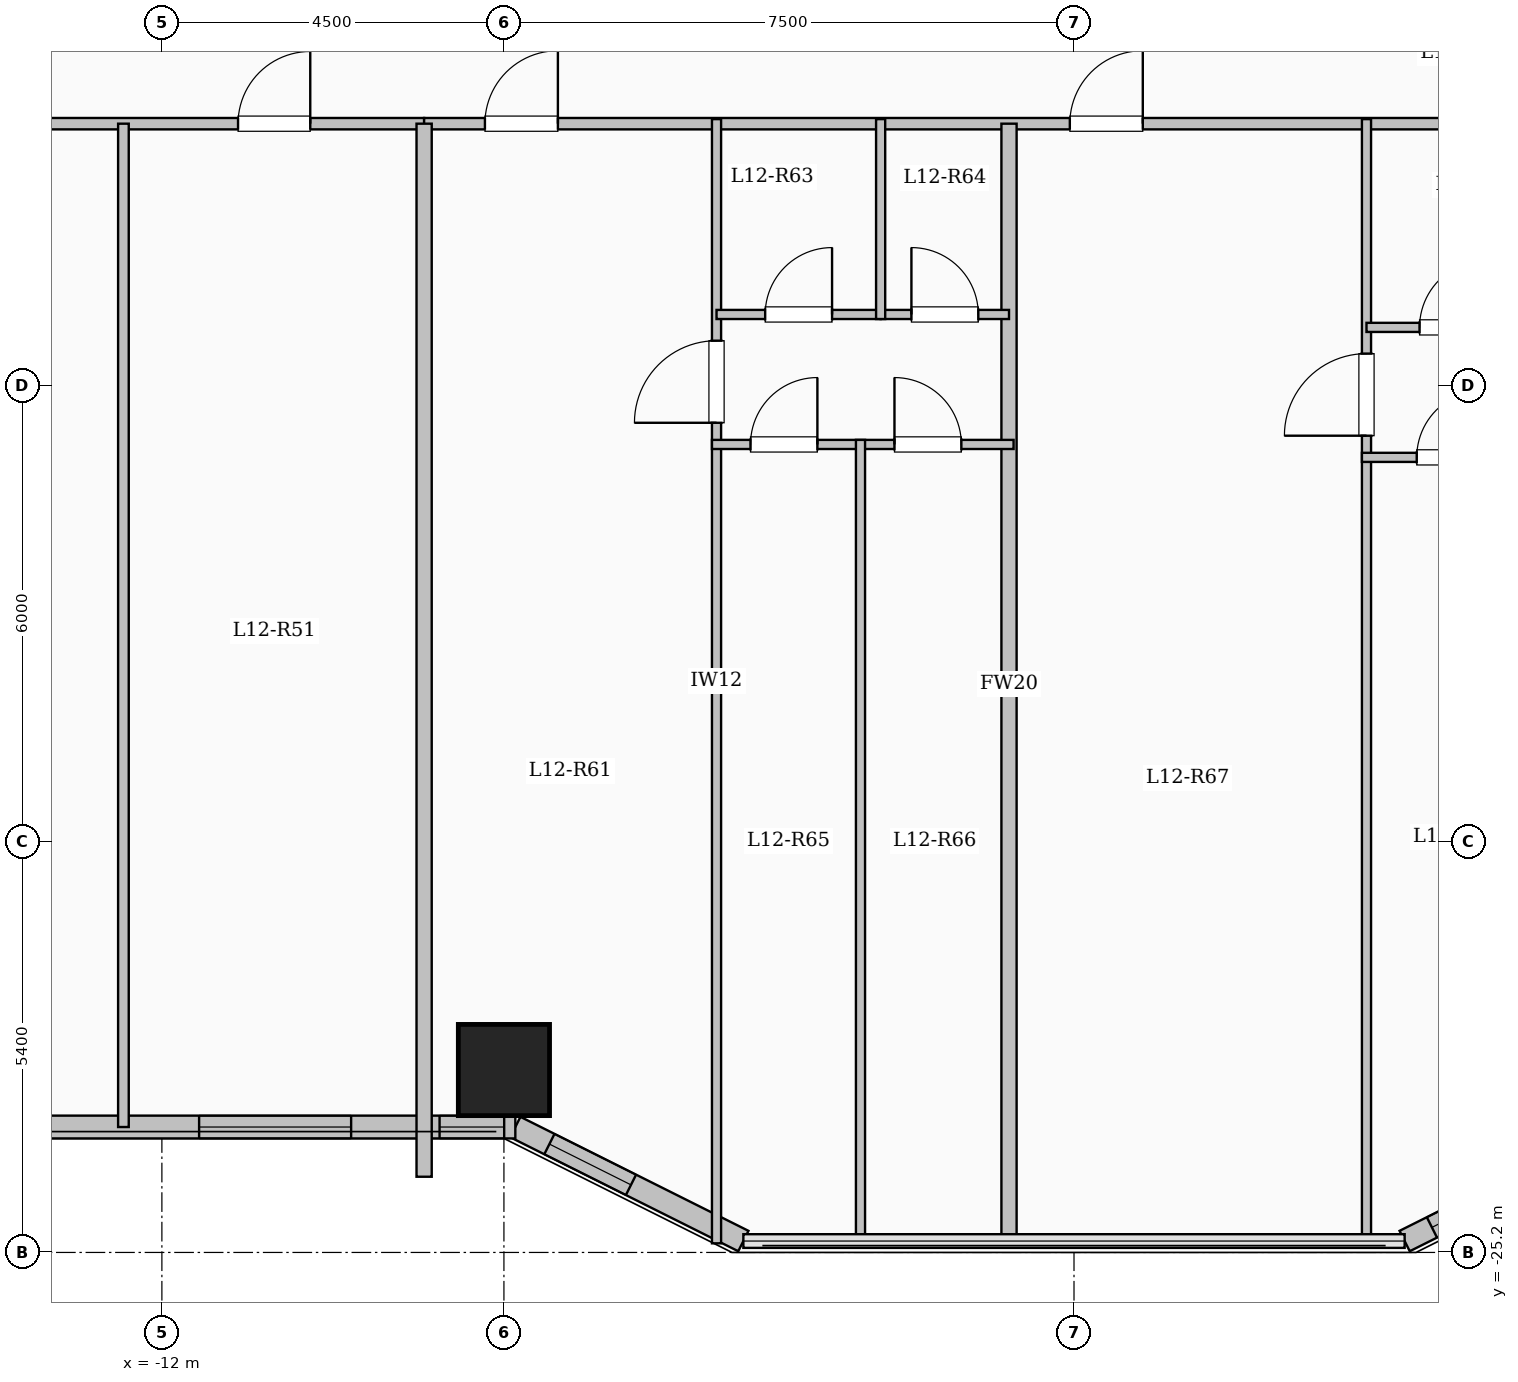
"""IFC4 building model, lengths in metres.
Left out: names, types, materials, properties, quantities, classifications, styles, units other than length and angle.
Written with IfcOpenShell. Run it as: python <this file> out.ifc"""

import sys

from ifc_helpers import new_model, si_unit, direction, frame, frame_2d, origin, origin_2d, place, context, subcontext, project, spatial, rectangle, extrude, element, fill, save


model = new_model("IFC4")
c1 = context("Model", 3, precision=1e-05, world=origin(), true_north=direction((0.0, 1.0)))
c2 = subcontext(c1, "Body", "Model", "MODEL_VIEW")
j1 = project(units=[si_unit("LENGTHUNIT", "METRE"), si_unit("PLANEANGLEUNIT", "RADIAN")], contexts=[c1])
p1 = place(None, origin())
s1 = spatial("IfcSite", under=j1, at=p1, CompositionType="ELEMENT")
p2 = place(p1, origin())
s2 = spatial("IfcBuilding", under=s1, at=p2, CompositionType="ELEMENT")
p3 = place(p2, frame((0.0, 0.0, 47.45)))
s3 = spatial("IfcBuildingStorey", under=s2, at=p3, CompositionType="ELEMENT", Elevation=47.45)
p4 = place(p3, frame((-7.5, -22.8, 0.0), z_axis=(0.0, 0.0, 1.0), x_axis=(1.0, 0.0, 0.0)))
e1 = element("IfcColumn", 1, at=p4, inside=s3, PredefinedType="COLUMN", context=c2, shape_type="SweptSolid", body=[
    extrude(rectangle(XDim=1.2, YDim=1.2, at=origin_2d()), origin(), (0.0, 0.0, 1.0), 3.35),
])
p5 = place(p3, frame((7.35, -23.55, 0.0), z_axis=(0.0, 0.0, 1.0), x_axis=(-0.894427191, -0.4472135955, 0.0)))
e2 = element("IfcWall", 2, at=p5, inside=s3, PredefinedType="SOLIDWALL", context=c2, shape_type="SweptSolid", body=[
    extrude(rectangle(XDim=3.354, YDim=0.3, at=frame_2d((1.677, 0.0))), origin(), (0.0, 0.0, 1.0), 3.1),
])
p6 = place(p5, frame((2.103, 0.0, 0.95)))
e3 = element("IfcOpeningElement", 3, at=p6, cuts=e2, PredefinedType="OPENING", context=c2, shape_type="SweptSolid", body=[
    extrude(rectangle(XDim=0.85, YDim=1.5, at=frame_2d((0.425, 0.75))), frame((0.0, 0.16, 0.0), z_axis=(0.0, -1.0, 0.0), x_axis=(1.0, 0.0, 0.0)), (0.0, 0.0, 1.0), 0.32),
])
p7 = place(p3, frame((-4.35, -25.05, 0.0), z_axis=(0.0, 0.0, 1.0), x_axis=(-0.894427191, 0.4472135955, 0.0)))
e4 = element("IfcWall", 4, at=p7, inside=s3, PredefinedType="SOLIDWALL", context=c2, shape_type="SweptSolid", body=[
    extrude(rectangle(XDim=3.354, YDim=0.3, at=frame_2d((1.677, 0.0))), origin(), (0.0, 0.0, 1.0), 3.1),
])
p8 = place(p7, frame((1.653, 0.0, 0.95)))
e5 = element("IfcOpeningElement", 5, at=p8, cuts=e4, PredefinedType="OPENING", context=c2, shape_type="SweptSolid", body=[
    extrude(rectangle(XDim=1.2, YDim=1.5, at=frame_2d((0.6, 0.75))), frame((0.0, 0.16, 0.0), z_axis=(0.0, -1.0, 0.0), x_axis=(1.0, 0.0, 0.0)), (0.0, 0.0, 1.0), 0.32),
])
p9 = place(p3, frame((-7.35, -23.55, 0.0), z_axis=(0.0, 0.0, 1.0), x_axis=(-1.0, 0.0, 0.0)))
e6 = element("IfcWall", 6, at=p9, inside=s3, PredefinedType="SOLIDWALL", context=c2, shape_type="SweptSolid", body=[
    extrude(rectangle(XDim=15.3, YDim=0.3, at=frame_2d((7.65, 0.0))), origin(), (0.0, 0.0, 1.0), 3.1),
])
p10 = place(p9, frame((0.147, 0.0, 0.95)))
e7 = element("IfcOpeningElement", 7, at=p10, cuts=e6, PredefinedType="OPENING", context=c2, shape_type="SweptSolid", body=[
    extrude(rectangle(XDim=0.85, YDim=1.5, at=frame_2d((0.425, 0.75))), frame((0.0, 0.16, 0.0), z_axis=(0.0, -1.0, 0.0), x_axis=(1.0, 0.0, 0.0)), (0.0, 0.0, 1.0), 0.32),
])
p11 = place(p9, frame((2.16, 0.0, 0.9)))
e8 = element("IfcOpeningElement", 8, at=p11, cuts=e6, PredefinedType="OPENING", context=c2, shape_type="SweptSolid", body=[
    extrude(rectangle(XDim=2.0, YDim=1.7, at=frame_2d((1.0, 0.85))), frame((0.0, 0.16, 0.0), z_axis=(0.0, -1.0, 0.0), x_axis=(1.0, 0.0, 0.0)), (0.0, 0.0, 1.0), 0.32),
])
p12 = place(p9, frame((6.65, 0.0, 0.9)))
e9 = element("IfcOpeningElement", 9, at=p12, cuts=e6, PredefinedType="OPENING", context=c2, shape_type="SweptSolid", body=[
    extrude(rectangle(XDim=2.0, YDim=1.7, at=frame_2d((1.0, 0.85))), frame((0.0, 0.16, 0.0), z_axis=(0.0, -1.0, 0.0), x_axis=(1.0, 0.0, 0.0)), (0.0, 0.0, 1.0), 0.32),
])
p13 = place(p9, frame((11.717, 0.0, 0.9)))
e10 = element("IfcOpeningElement", 10, at=p13, cuts=e6, PredefinedType="OPENING", context=c2, shape_type="SweptSolid", body=[
    extrude(rectangle(XDim=2.0, YDim=1.7, at=frame_2d((1.0, 0.85))), frame((0.0, 0.16, 0.0), z_axis=(0.0, -1.0, 0.0), x_axis=(1.0, 0.0, 0.0)), (0.0, 0.0, 1.0), 0.32),
])
p14 = place(p3, frame((-22.55, -10.35, 0.0), z_axis=(0.0, 0.0, 1.0), x_axis=(1.0, 0.0, 0.0)))
e11 = element("IfcWall", 11, at=p14, inside=s3, PredefinedType="PARTITIONING", context=c2, shape_type="SweptSolid", body=[
    extrude(rectangle(XDim=14.0, YDim=0.15, at=frame_2d((7.0, 0.0))), origin(), (0.0, 0.0, 1.0), 3.1),
])
p15 = place(p14, frame((2.006, 0.0, 0.0)))
e12 = element("IfcOpeningElement", 12, at=p15, cuts=e11, PredefinedType="OPENING", context=c2, shape_type="SweptSolid", body=[
    extrude(rectangle(XDim=0.95, YDim=2.15, at=frame_2d((0.475, 1.075))), frame((0.0, 0.085, 0.0), z_axis=(0.0, -1.0, 0.0), x_axis=(1.0, 0.0, 0.0)), (0.0, 0.0, 1.0), 0.17),
])
p16 = place(p14, frame((7.058, 0.0, 0.0)))
e13 = element("IfcOpeningElement", 13, at=p16, cuts=e11, PredefinedType="OPENING", context=c2, shape_type="SweptSolid", body=[
    extrude(rectangle(XDim=0.95, YDim=2.15, at=frame_2d((0.475, 1.075))), frame((0.0, 0.085, 0.0), z_axis=(0.0, -1.0, 0.0), x_axis=(1.0, 0.0, 0.0)), (0.0, 0.0, 1.0), 0.17),
])
p17 = place(p14, frame((11.552, 0.0, 0.0)))
e14 = element("IfcOpeningElement", 14, at=p17, cuts=e11, PredefinedType="OPENING", context=c2, shape_type="SweptSolid", body=[
    extrude(rectangle(XDim=0.95, YDim=2.15, at=frame_2d((0.475, 1.075))), frame((0.0, 0.085, 0.0), z_axis=(0.0, -1.0, 0.0), x_axis=(1.0, 0.0, 0.0)), (0.0, 0.0, 1.0), 0.17),
])
p18 = place(p3, frame((-8.55, -10.35, 0.0), z_axis=(0.0, 0.0, 1.0), x_axis=(1.0, 0.0, 0.0)))
e15 = element("IfcWall", 15, at=p18, inside=s3, PredefinedType="PARTITIONING", context=c2, shape_type="SweptSolid", body=[
    extrude(rectangle(XDim=17.1, YDim=0.15, at=frame_2d((8.55, 0.0))), origin(), (0.0, 0.0, 1.0), 3.1),
])
p19 = place(p18, frame((0.8, 0.0, 0.0)))
e16 = element("IfcOpeningElement", 16, at=p19, cuts=e15, PredefinedType="OPENING", context=c2, shape_type="SweptSolid", body=[
    extrude(rectangle(XDim=0.96, YDim=2.15, at=frame_2d((0.48, 1.075))), frame((0.0, 0.085, 0.0), z_axis=(0.0, -1.0, 0.0), x_axis=(1.0, 0.0, 0.0)), (0.0, 0.0, 1.0), 0.17),
])
p20 = place(p18, frame((8.495, 0.0, 0.0)))
e17 = element("IfcOpeningElement", 17, at=p20, cuts=e15, PredefinedType="OPENING", context=c2, shape_type="SweptSolid", body=[
    extrude(rectangle(XDim=0.96, YDim=2.15, at=frame_2d((0.48, 1.075))), frame((0.0, 0.085, 0.0), z_axis=(0.0, -1.0, 0.0), x_axis=(1.0, 0.0, 0.0)), (0.0, 0.0, 1.0), 0.17),
])
p21 = place(p3, frame((-12.506, -23.55, 0.0), z_axis=(0.0, 0.0, 1.0), x_axis=(0.0, 1.0, 0.0)))
e18 = element("IfcWall", 18, at=p21, inside=s3, PredefinedType="PARTITIONING", context=c2, shape_type="SweptSolid", body=[
    extrude(rectangle(XDim=13.2, YDim=0.14, at=frame_2d((6.6, 0.0))), origin(), (0.0, 0.0, 1.0), 3.1),
])
p22 = place(p3, frame((-8.55, -24.204, 0.0), z_axis=(0.0, 0.0, 1.0), x_axis=(0.0, 1.0, 0.0)))
e19 = element("IfcWall", 19, at=p22, inside=s3, PredefinedType="SOLIDWALL", context=c2, shape_type="SweptSolid", body=[
    extrude(rectangle(XDim=13.854, YDim=0.2, at=frame_2d((6.927, 0.0))), origin(), (0.0, 0.0, 1.0), 3.1),
])
p23 = place(p3, frame((-0.855, -25.08, 0.0), z_axis=(0.0, 0.0, 1.0), x_axis=(0.0, 1.0, 0.0)))
e20 = element("IfcWall", 20, at=p23, inside=s3, PredefinedType="SOLIDWALL", context=c2, shape_type="SweptSolid", body=[
    extrude(rectangle(XDim=14.73, YDim=0.2, at=frame_2d((7.365, 0.0))), origin(), (0.0, 0.0, 1.0), 3.1),
])
p24 = place(p3, frame((-4.703, -25.08, 0.0), z_axis=(0.0, 0.0, 1.0), x_axis=(0.0, 1.0, 0.0)))
e21 = element("IfcWall", 21, at=p24, inside=s3, PredefinedType="PARTITIONING", context=c2, shape_type="SweptSolid", body=[
    extrude(rectangle(XDim=14.79, YDim=0.12, at=frame_2d((7.395, 0.0))), origin(), (0.0, 0.0, 1.0), 3.1),
])
p25 = place(p24, frame((10.795, 0.0, 0.0)))
e22 = element("IfcOpeningElement", 22, at=p25, cuts=e21, PredefinedType="OPENING", context=c2, shape_type="SweptSolid", body=[
    extrude(rectangle(XDim=1.08, YDim=2.15, at=frame_2d((0.54, 1.075))), frame((0.0, 0.07, 0.0), z_axis=(0.0, -1.0, 0.0), x_axis=(1.0, 0.0, 0.0)), (0.0, 0.0, 1.0), 0.14),
])
p26 = place(p3, frame((-4.703, -12.86, 0.0), z_axis=(0.0, 0.0, 1.0), x_axis=(1.0, 0.0, 0.0)))
e23 = element("IfcWall", 23, at=p26, inside=s3, PredefinedType="PARTITIONING", context=c2, shape_type="SweptSolid", body=[
    extrude(rectangle(XDim=2.159, YDim=0.12, at=frame_2d((1.08, 0.0))), origin(), (0.0, 0.0, 1.0), 2.585),
])
p27 = place(p26, frame((0.64, 0.0, 0.0)))
e24 = element("IfcOpeningElement", 24, at=p27, cuts=e23, PredefinedType="OPENING", context=c2, shape_type="SweptSolid", body=[
    extrude(rectangle(XDim=0.88, YDim=2.1, at=frame_2d((0.44, 1.05))), frame((0.0, 0.07, 0.0), z_axis=(0.0, -1.0, 0.0), x_axis=(1.0, 0.0, 0.0)), (0.0, 0.0, 1.0), 0.14),
])
p28 = place(p3, frame((-2.544, -12.86, 0.0), z_axis=(0.0, 0.0, 1.0), x_axis=(1.0, 0.0, 0.0)))
e25 = element("IfcWall", 25, at=p28, inside=s3, PredefinedType="PARTITIONING", context=c2, shape_type="SweptSolid", body=[
    extrude(rectangle(XDim=1.689, YDim=0.12, at=frame_2d((0.844, 0.0))), origin(), (0.0, 0.0, 1.0), 2.585),
])
p29 = place(p28, frame((0.405, 0.0, 0.0)))
e26 = element("IfcOpeningElement", 26, at=p29, cuts=e25, PredefinedType="OPENING", context=c2, shape_type="SweptSolid", body=[
    extrude(rectangle(XDim=0.88, YDim=2.1, at=frame_2d((0.44, 1.05))), frame((0.0, 0.07, 0.0), z_axis=(0.0, -1.0, 0.0), x_axis=(1.0, 0.0, 0.0)), (0.0, 0.0, 1.0), 0.14),
])
p30 = place(p3, frame((-4.763, -14.57, 0.0), z_axis=(0.0, 0.0, 1.0), x_axis=(1.0, 0.0, 0.0)))
e27 = element("IfcWall", 27, at=p30, inside=s3, PredefinedType="PARTITIONING", context=c2, shape_type="SweptSolid", body=[
    extrude(rectangle(XDim=3.968, YDim=0.12, at=frame_2d((1.984, 0.0))), origin(), (0.0, 0.0, 1.0), 3.1),
])
p31 = place(p30, frame((0.507, 0.0, 0.0)))
e28 = element("IfcOpeningElement", 28, at=p31, cuts=e27, PredefinedType="OPENING", context=c2, shape_type="SweptSolid", body=[
    extrude(rectangle(XDim=0.88, YDim=2.1, at=frame_2d((0.44, 1.05))), frame((0.0, 0.07, 0.0), z_axis=(0.0, -1.0, 0.0), x_axis=(1.0, 0.0, 0.0)), (0.0, 0.0, 1.0), 0.14),
])
p32 = place(p30, frame((2.401, 0.0, 0.0)))
e29 = element("IfcOpeningElement", 29, at=p32, cuts=e27, PredefinedType="OPENING", context=c2, shape_type="SweptSolid", body=[
    extrude(rectangle(XDim=0.88, YDim=2.1, at=frame_2d((0.44, 1.05))), frame((0.0, 0.07, 0.0), z_axis=(0.0, -1.0, 0.0), x_axis=(1.0, 0.0, 0.0)), (0.0, 0.0, 1.0), 0.14),
])
p33 = place(p3, frame((-2.544, -12.92, 0.0), z_axis=(0.0, 0.0, 1.0), x_axis=(0.0, 1.0, 0.0)))
e30 = element("IfcWall", 30, at=p33, inside=s3, PredefinedType="PARTITIONING", context=c2, shape_type="SweptSolid", body=[
    extrude(rectangle(XDim=2.63, YDim=0.12, at=frame_2d((1.315, 0.0))), origin(), (0.0, 0.0, 1.0), 3.1),
])
p34 = place(p3, frame((-2.809, -25.08, 0.0), z_axis=(0.0, 0.0, 1.0), x_axis=(0.0, 1.0, 0.0)))
e31 = element("IfcWall", 31, at=p34, inside=s3, PredefinedType="PARTITIONING", context=c2, shape_type="SweptSolid", body=[
    extrude(rectangle(XDim=10.57, YDim=0.12, at=frame_2d((5.285, 0.0))), origin(), (0.0, 0.0, 1.0), 3.1),
])
p35 = place(p3, frame((3.848, -25.08, 0.0), z_axis=(0.0, 0.0, 1.0), x_axis=(0.0, 1.0, 0.0)))
e32 = element("IfcWall", 32, at=p35, inside=s3, PredefinedType="PARTITIONING", context=c2, shape_type="SweptSolid", body=[
    extrude(rectangle(XDim=14.79, YDim=0.12, at=frame_2d((7.395, 0.0))), origin(), (0.0, 0.0, 1.0), 3.1),
])
p36 = place(p35, frame((10.625, 0.0, 0.0)))
e33 = element("IfcOpeningElement", 33, at=p36, cuts=e32, PredefinedType="OPENING", context=c2, shape_type="SweptSolid", body=[
    extrude(rectangle(XDim=1.08, YDim=2.15, at=frame_2d((0.54, 1.075))), frame((0.0, 0.07, 0.0), z_axis=(0.0, -1.0, 0.0), x_axis=(1.0, 0.0, 0.0)), (0.0, 0.0, 1.0), 0.14),
])
p37 = place(p3, frame((3.848, -13.03, 0.0), z_axis=(0.0, 0.0, 1.0), x_axis=(1.0, 0.0, 0.0)))
e34 = element("IfcWall", 34, at=p37, inside=s3, PredefinedType="PARTITIONING", context=c2, shape_type="SweptSolid", body=[
    extrude(rectangle(XDim=2.275, YDim=0.12, at=frame_2d((1.138, 0.0))), origin(), (0.0, 0.0, 1.0), 2.585),
])
p38 = place(p37, frame((0.698, 0.0, 0.0)))
e35 = element("IfcOpeningElement", 35, at=p38, cuts=e34, PredefinedType="OPENING", context=c2, shape_type="SweptSolid", body=[
    extrude(rectangle(XDim=0.88, YDim=2.1, at=frame_2d((0.44, 1.05))), frame((0.0, 0.07, 0.0), z_axis=(0.0, -1.0, 0.0), x_axis=(1.0, 0.0, 0.0)), (0.0, 0.0, 1.0), 0.14),
])
p39 = place(p3, frame((3.788, -14.74, 0.0), z_axis=(0.0, 0.0, 1.0), x_axis=(1.0, 0.0, 0.0)))
e36 = element("IfcWall", 36, at=p39, inside=s3, PredefinedType="PARTITIONING", context=c2, shape_type="SweptSolid", body=[
    extrude(rectangle(XDim=4.822, YDim=0.12, at=frame_2d((2.411, 0.0))), origin(), (0.0, 0.0, 1.0), 2.585),
])
p40 = place(p39, frame((0.721, 0.0, 0.0)))
e37 = element("IfcOpeningElement", 37, at=p40, cuts=e36, PredefinedType="OPENING", context=c2, shape_type="SweptSolid", body=[
    extrude(rectangle(XDim=0.88, YDim=2.1, at=frame_2d((0.44, 1.05))), frame((0.0, 0.07, 0.0), z_axis=(0.0, -1.0, 0.0), x_axis=(1.0, 0.0, 0.0)), (0.0, 0.0, 1.0), 0.14),
])
p41 = place(p39, frame((3.042, 0.0, 0.0)))
e38 = element("IfcOpeningElement", 38, at=p41, cuts=e36, PredefinedType="OPENING", context=c2, shape_type="SweptSolid", body=[
    extrude(rectangle(XDim=0.88, YDim=2.1, at=frame_2d((0.44, 1.05))), frame((0.0, 0.07, 0.0), z_axis=(0.0, -1.0, 0.0), x_axis=(1.0, 0.0, 0.0)), (0.0, 0.0, 1.0), 0.14),
])
p42 = place(p6, origin())
e39 = element("IfcWindow", 39, at=p42, inside=s3, PartitioningType="SINGLE_PANEL", PredefinedType="WINDOW", context=c2, shape_type="SweptSolid", body=[
    extrude(rectangle(XDim=0.85, YDim=1.5, at=frame_2d((0.425, 0.75))), frame((0.0, 0.03, 0.0), z_axis=(0.0, -1.0, 0.0), x_axis=(1.0, 0.0, 0.0)), (0.0, 0.0, 1.0), 0.06),
])
fill(e3, e39)
p43 = place(p8, origin())
e40 = element("IfcWindow", 40, at=p43, inside=s3, PartitioningType="SINGLE_PANEL", PredefinedType="WINDOW", context=c2, shape_type="SweptSolid", body=[
    extrude(rectangle(XDim=1.2, YDim=1.5, at=frame_2d((0.6, 0.75))), frame((0.0, 0.03, 0.0), z_axis=(0.0, -1.0, 0.0), x_axis=(1.0, 0.0, 0.0)), (0.0, 0.0, 1.0), 0.06),
])
fill(e5, e40)
p44 = place(p10, origin())
e41 = element("IfcWindow", 41, at=p44, inside=s3, PartitioningType="SINGLE_PANEL", PredefinedType="WINDOW", context=c2, shape_type="SweptSolid", body=[
    extrude(rectangle(XDim=0.85, YDim=1.5, at=frame_2d((0.425, 0.75))), frame((0.0, 0.03, 0.0), z_axis=(0.0, -1.0, 0.0), x_axis=(1.0, 0.0, 0.0)), (0.0, 0.0, 1.0), 0.06),
])
fill(e7, e41)
p45 = place(p11, origin())
e42 = element("IfcWindow", 42, at=p45, inside=s3, PartitioningType="SINGLE_PANEL", PredefinedType="WINDOW", context=c2, shape_type="SweptSolid", body=[
    extrude(rectangle(XDim=2.0, YDim=1.7, at=frame_2d((1.0, 0.85))), frame((0.0, 0.03, 0.0), z_axis=(0.0, -1.0, 0.0), x_axis=(1.0, 0.0, 0.0)), (0.0, 0.0, 1.0), 0.06),
])
fill(e8, e42)
p46 = place(p17, origin())
e43 = element("IfcDoor", 43, at=p46, inside=s3, OperationType="SINGLE_SWING_RIGHT", PredefinedType="DOOR", context=c2, shape_type="SweptSolid", body=[
    extrude(rectangle(XDim=0.95, YDim=2.15, at=frame_2d((0.475, 1.075))), frame((0.0, 0.025, 0.0), z_axis=(0.0, -1.0, 0.0), x_axis=(1.0, 0.0, 0.0)), (0.0, 0.0, 1.0), 0.05),
])
fill(e14, e43)
p47 = place(p19, origin())
e44 = element("IfcDoor", 44, at=p47, inside=s3, OperationType="SINGLE_SWING_RIGHT", PredefinedType="DOOR", context=c2, shape_type="SweptSolid", body=[
    extrude(rectangle(XDim=0.96, YDim=2.15, at=frame_2d((0.48, 1.075))), frame((0.0, 0.025, 0.0), z_axis=(0.0, -1.0, 0.0), x_axis=(1.0, 0.0, 0.0)), (0.0, 0.0, 1.0), 0.05),
])
fill(e16, e44)
p48 = place(p25, origin())
e45 = element("IfcDoor", 45, at=p48, inside=s3, OperationType="SINGLE_SWING_LEFT", PredefinedType="DOOR", context=c2, shape_type="SweptSolid", body=[
    extrude(rectangle(XDim=1.08, YDim=2.15, at=frame_2d((0.54, 1.075))), frame((0.0, 0.025, 0.0), z_axis=(0.0, -1.0, 0.0), x_axis=(1.0, 0.0, 0.0)), (0.0, 0.0, 1.0), 0.05),
])
fill(e22, e45)
p49 = place(p27, origin())
e46 = element("IfcDoor", 46, at=p49, inside=s3, OperationType="SINGLE_SWING_RIGHT", PredefinedType="DOOR", context=c2, shape_type="SweptSolid", body=[
    extrude(rectangle(XDim=0.88, YDim=2.1, at=frame_2d((0.44, 1.05))), frame((0.0, 0.025, 0.0), z_axis=(0.0, -1.0, 0.0), x_axis=(1.0, 0.0, 0.0)), (0.0, 0.0, 1.0), 0.05),
])
fill(e24, e46)
p50 = place(p29, origin())
e47 = element("IfcDoor", 47, at=p50, inside=s3, OperationType="SINGLE_SWING_LEFT", PredefinedType="DOOR", context=c2, shape_type="SweptSolid", body=[
    extrude(rectangle(XDim=0.88, YDim=2.1, at=frame_2d((0.44, 1.05))), frame((0.0, 0.025, 0.0), z_axis=(0.0, -1.0, 0.0), x_axis=(1.0, 0.0, 0.0)), (0.0, 0.0, 1.0), 0.05),
])
fill(e26, e47)
p51 = place(p31, origin())
e48 = element("IfcDoor", 48, at=p51, inside=s3, OperationType="SINGLE_SWING_RIGHT", PredefinedType="DOOR", context=c2, shape_type="SweptSolid", body=[
    extrude(rectangle(XDim=0.88, YDim=2.1, at=frame_2d((0.44, 1.05))), frame((0.0, 0.025, 0.0), z_axis=(0.0, -1.0, 0.0), x_axis=(1.0, 0.0, 0.0)), (0.0, 0.0, 1.0), 0.05),
])
fill(e28, e48)
p52 = place(p32, origin())
e49 = element("IfcDoor", 49, at=p52, inside=s3, OperationType="SINGLE_SWING_LEFT", PredefinedType="DOOR", context=c2, shape_type="SweptSolid", body=[
    extrude(rectangle(XDim=0.88, YDim=2.1, at=frame_2d((0.44, 1.05))), frame((0.0, 0.025, 0.0), z_axis=(0.0, -1.0, 0.0), x_axis=(1.0, 0.0, 0.0)), (0.0, 0.0, 1.0), 0.05),
])
fill(e29, e49)
p53 = place(p20, origin())
e50 = element("IfcDoor", 50, at=p53, inside=s3, OperationType="SINGLE_SWING_RIGHT", PredefinedType="DOOR", context=c2, shape_type="SweptSolid", body=[
    extrude(rectangle(XDim=0.96, YDim=2.15, at=frame_2d((0.48, 1.075))), frame((0.0, 0.025, 0.0), z_axis=(0.0, -1.0, 0.0), x_axis=(1.0, 0.0, 0.0)), (0.0, 0.0, 1.0), 0.05),
])
fill(e17, e50)
p54 = place(p36, origin())
e51 = element("IfcDoor", 51, at=p54, inside=s3, OperationType="SINGLE_SWING_LEFT", PredefinedType="DOOR", context=c2, shape_type="SweptSolid", body=[
    extrude(rectangle(XDim=1.08, YDim=2.15, at=frame_2d((0.54, 1.075))), frame((0.0, 0.025, 0.0), z_axis=(0.0, -1.0, 0.0), x_axis=(1.0, 0.0, 0.0)), (0.0, 0.0, 1.0), 0.05),
])
fill(e33, e51)
p55 = place(p38, origin())
e52 = element("IfcDoor", 52, at=p55, inside=s3, OperationType="SINGLE_SWING_RIGHT", PredefinedType="DOOR", context=c2, shape_type="SweptSolid", body=[
    extrude(rectangle(XDim=0.88, YDim=2.1, at=frame_2d((0.44, 1.05))), frame((0.0, 0.025, 0.0), z_axis=(0.0, -1.0, 0.0), x_axis=(1.0, 0.0, 0.0)), (0.0, 0.0, 1.0), 0.05),
])
fill(e35, e52)
p56 = place(p40, origin())
e53 = element("IfcDoor", 53, at=p56, inside=s3, OperationType="SINGLE_SWING_RIGHT", PredefinedType="DOOR", context=c2, shape_type="SweptSolid", body=[
    extrude(rectangle(XDim=0.88, YDim=2.1, at=frame_2d((0.44, 1.05))), frame((0.0, 0.025, 0.0), z_axis=(0.0, -1.0, 0.0), x_axis=(1.0, 0.0, 0.0)), (0.0, 0.0, 1.0), 0.05),
])
fill(e37, e53)
save(model, sys.argv[1])
